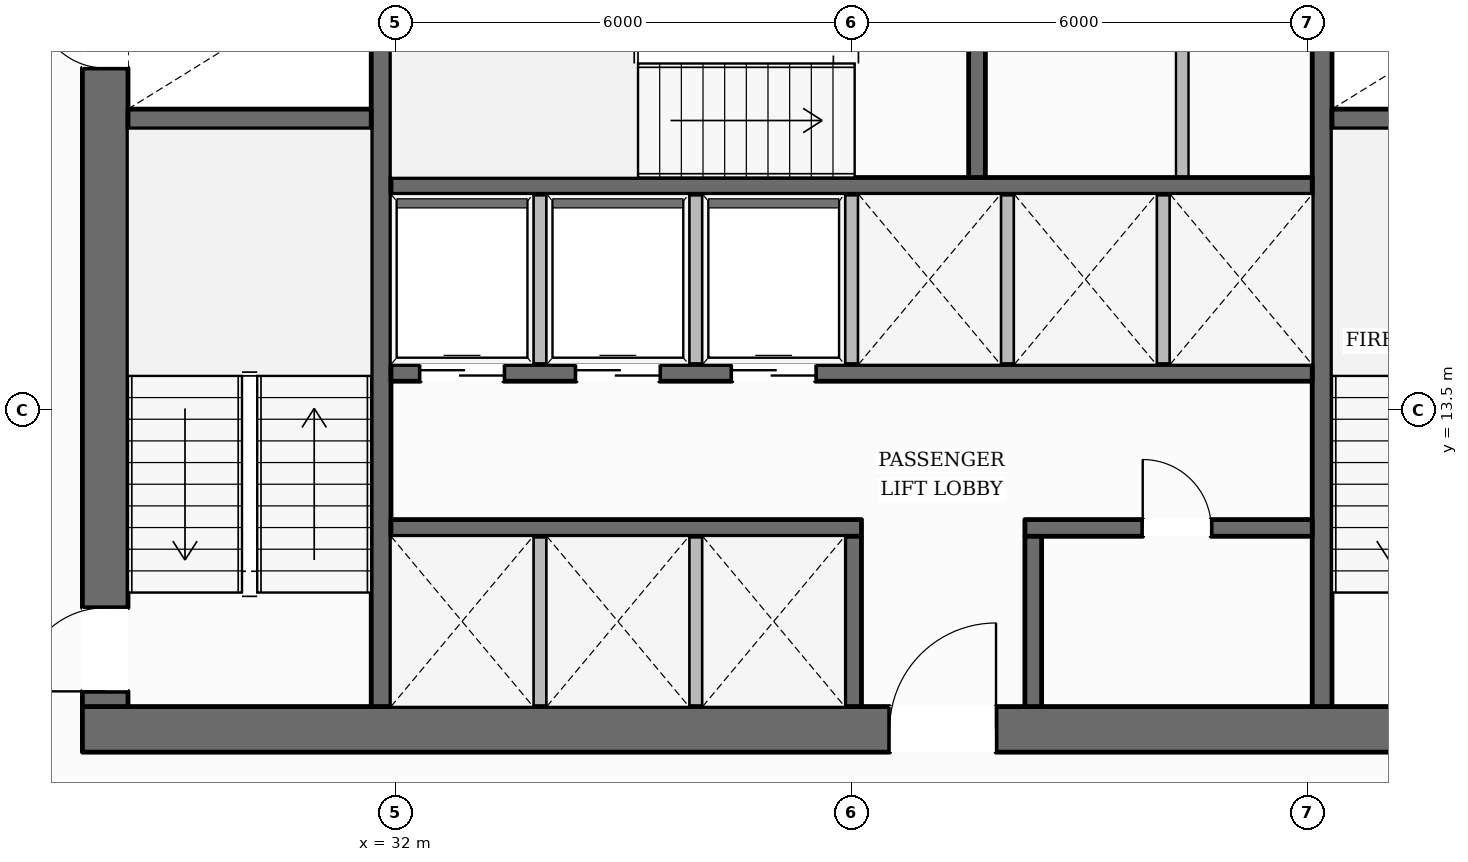
"""IFC4 building model, lengths in metres.
Left out: names, types, materials, properties, quantities, classifications, styles, units other than length and angle.
Written with IfcOpenShell. Run it as: python <this file> out.ifc"""

import sys

from ifc_helpers import new_model, si_unit, direction, frame, frame_2d, origin, place, context, subcontext, project, spatial, rectangle, extrude, element, fill, save


model = new_model("IFC4")
c1 = context("Model", 3, precision=1e-05, world=origin(), true_north=direction((0.0, 1.0)))
c2 = subcontext(c1, "Body", "Model", "MODEL_VIEW")
j1 = project(units=[si_unit("LENGTHUNIT", "METRE"), si_unit("PLANEANGLEUNIT", "RADIAN")], contexts=[c1])
p1 = place(None, origin())
s1 = spatial("IfcSite", under=j1, at=p1, CompositionType="ELEMENT")
p2 = place(p1, origin())
s2 = spatial("IfcBuilding", under=s1, at=p2, CompositionType="ELEMENT")
p3 = place(p2, frame((0.0, 0.0, 52.2)))
s3 = spatial("IfcBuildingStorey", under=s2, at=p3, CompositionType="ELEMENT", Elevation=52.2)
p4 = place(p3, frame((27.88, 9.3, 0.0), z_axis=(0.0, 0.0, 1.0), x_axis=(1.0, 0.0, 0.0)))
e1 = element("IfcWall", 1, at=p4, inside=s3, PredefinedType="SOLIDWALL", context=c2, shape_type="SweptSolid", body=[
    extrude(rectangle(XDim=20.24, YDim=0.6, at=frame_2d((10.12, 0.0))), origin(), (0.0, 0.0, 1.0), 3.59),
])
p5 = place(p4, frame((10.62, 0.0, 0.0)))
e2 = element("IfcOpeningElement", 2, at=p5, cuts=e1, PredefinedType="OPENING", context=c2, shape_type="SweptSolid", body=[
    extrude(rectangle(XDim=1.4, YDim=2.2, at=frame_2d((0.7, 1.1))), frame((0.0, 0.31, 0.0), z_axis=(0.0, -1.0, 0.0), x_axis=(1.0, 0.0, 0.0)), (0.0, 0.0, 1.0), 0.62),
])
p6 = place(p3, frame((28.18, 9.6, 0.0), z_axis=(0.0, 0.0, 1.0), x_axis=(0.0, 1.0, 0.0)))
e3 = element("IfcWall", 3, at=p6, inside=s3, PredefinedType="SOLIDWALL", context=c2, shape_type="SweptSolid", body=[
    extrude(rectangle(XDim=13.0, YDim=0.6, at=frame_2d((6.5, 0.0))), origin(), (0.0, 0.0, 1.0), 3.59),
])
p7 = place(p6, frame((0.2, 0.0, 0.0)))
e4 = element("IfcOpeningElement", 4, at=p7, cuts=e3, PredefinedType="OPENING", context=c2, shape_type="SweptSolid", body=[
    extrude(rectangle(XDim=1.1, YDim=2.15, at=frame_2d((0.55, 1.075))), frame((0.0, 0.31, 0.0), z_axis=(0.0, -1.0, 0.0), x_axis=(1.0, 0.0, 0.0)), (0.0, 0.0, 1.0), 0.62),
])
p8 = place(p6, frame((8.4, 0.0, 0.0)))
e5 = element("IfcOpeningElement", 5, at=p8, cuts=e3, PredefinedType="OPENING", context=c2, shape_type="SweptSolid", body=[
    extrude(rectangle(XDim=0.9, YDim=2.1, at=frame_2d((0.45, 1.05))), frame((0.0, 0.31, 0.0), z_axis=(0.0, -1.0, 0.0), x_axis=(1.0, 0.0, 0.0)), (0.0, 0.0, 1.0), 0.62),
])
p9 = place(p3, frame((31.81, 9.6, 0.0), z_axis=(0.0, 0.0, 1.0), x_axis=(0.0, 1.0, 0.0)))
e6 = element("IfcWall", 6, at=p9, inside=s3, PredefinedType="SHEAR", context=c2, shape_type="SweptSolid", body=[
    extrude(rectangle(XDim=13.0, YDim=0.26, at=frame_2d((6.5, 0.0))), origin(), (0.0, 0.0, 1.0), 3.59),
])
p10 = place(p9, frame((10.925, 0.0, 0.0)))
e7 = element("IfcOpeningElement", 7, at=p10, cuts=e6, PredefinedType="OPENING", context=c2, shape_type="SweptSolid", body=[
    extrude(rectangle(XDim=1.25, YDim=2.25, at=frame_2d((0.625, 1.125))), frame((0.0, 0.14, 0.0), z_axis=(0.0, -1.0, 0.0), x_axis=(1.0, 0.0, 0.0)), (0.0, 0.0, 1.0), 0.28),
])
p11 = place(p3, frame((44.19, 9.6, 0.0), z_axis=(0.0, 0.0, 1.0), x_axis=(0.0, 1.0, 0.0)))
e8 = element("IfcWall", 8, at=p11, inside=s3, PredefinedType="SHEAR", context=c2, shape_type="SweptSolid", body=[
    extrude(rectangle(XDim=13.0, YDim=0.26, at=frame_2d((6.5, 0.0))), origin(), (0.0, 0.0, 1.0), 3.59),
])
p12 = place(p11, frame((10.925, 0.0, 0.0)))
e9 = element("IfcOpeningElement", 9, at=p12, cuts=e8, PredefinedType="OPENING", context=c2, shape_type="SweptSolid", body=[
    extrude(rectangle(XDim=1.25, YDim=2.25, at=frame_2d((0.625, 1.125))), frame((0.0, 0.14, 0.0), z_axis=(0.0, -1.0, 0.0), x_axis=(1.0, 0.0, 0.0)), (0.0, 0.0, 1.0), 0.28),
])
for number, where, z_axis, x_axis in (
    (10, (28.48, 17.33, 0.0), (0.0, 0.0, 1.0), (1.0, 0.0, 0.0)),
    (11, (44.32, 17.33, 0.0), (0.0, 0.0, 1.0), (1.0, 0.0, 0.0)),
):
    element("IfcWall", number, at=place(p3, frame(where, z_axis=z_axis, x_axis=x_axis)), inside=s3, PredefinedType="SHEAR", context=c2, shape_type="SweptSolid", body=[
        extrude(rectangle(XDim=3.2, YDim=0.26, at=frame_2d((1.6, 0.0))), origin(), (0.0, 0.0, 1.0), 3.59),
    ])
p13 = place(p3, frame((31.94, 16.45, 0.0), z_axis=(0.0, 0.0, 1.0), x_axis=(1.0, 0.0, 0.0)))
e12 = element("IfcWall", 12, at=p13, inside=s3, PredefinedType="SOLIDWALL", context=c2, shape_type="SweptSolid", body=[
    extrude(rectangle(XDim=12.12, YDim=0.22, at=frame_2d((6.06, 0.0))), origin(), (0.0, 0.0, 1.0), 3.59),
])
p14 = place(p3, frame((39.65, 16.56, 0.0), z_axis=(0.0, 0.0, 1.0), x_axis=(0.0, 1.0, 0.0)))
e13 = element("IfcWall", 13, at=p14, inside=s3, PredefinedType="SOLIDWALL", context=c2, shape_type="SweptSolid", body=[
    extrude(rectangle(XDim=3.2, YDim=0.22, at=frame_2d((1.6, 0.0))), origin(), (0.0, 0.0, 1.0), 3.59),
])
p15 = place(p3, frame((31.94, 13.99, 0.0), z_axis=(0.0, 0.0, 1.0), x_axis=(1.0, 0.0, 0.0)))
e14 = element("IfcWall", 14, at=p15, inside=s3, PredefinedType="SOLIDWALL", context=c2, shape_type="SweptSolid", body=[
    extrude(rectangle(XDim=12.12, YDim=0.22, at=frame_2d((6.06, 0.0))), origin(), (0.0, 0.0, 1.0), 3.59),
])
p16 = place(p15, frame((0.385, 0.0, 0.0)))
e15 = element("IfcOpeningElement", 15, at=p16, cuts=e14, PredefinedType="OPENING", context=c2, shape_type="SweptSolid", body=[
    extrude(rectangle(XDim=1.1, YDim=2.2, at=frame_2d((0.55, 1.1))), frame((0.0, 0.12, 0.0), z_axis=(0.0, -1.0, 0.0), x_axis=(1.0, 0.0, 0.0)), (0.0, 0.0, 1.0), 0.24),
])
p17 = place(p15, frame((2.435, 0.0, 0.0)))
e16 = element("IfcOpeningElement", 16, at=p17, cuts=e14, PredefinedType="OPENING", context=c2, shape_type="SweptSolid", body=[
    extrude(rectangle(XDim=1.1, YDim=2.2, at=frame_2d((0.55, 1.1))), frame((0.0, 0.12, 0.0), z_axis=(0.0, -1.0, 0.0), x_axis=(1.0, 0.0, 0.0)), (0.0, 0.0, 1.0), 0.24),
])
p18 = place(p15, frame((4.485, 0.0, 0.0)))
e17 = element("IfcOpeningElement", 17, at=p18, cuts=e14, PredefinedType="OPENING", context=c2, shape_type="SweptSolid", body=[
    extrude(rectangle(XDim=1.1, YDim=2.2, at=frame_2d((0.55, 1.1))), frame((0.0, 0.12, 0.0), z_axis=(0.0, -1.0, 0.0), x_axis=(1.0, 0.0, 0.0)), (0.0, 0.0, 1.0), 0.24),
])
p19 = place(p3, frame((31.94, 11.95, 0.0), z_axis=(0.0, 0.0, 1.0), x_axis=(1.0, 0.0, 0.0)))
e18 = element("IfcWall", 18, at=p19, inside=s3, PredefinedType="SOLIDWALL", context=c2, shape_type="SweptSolid", body=[
    extrude(rectangle(XDim=6.19, YDim=0.22, at=frame_2d((3.095, 0.0))), origin(), (0.0, 0.0, 1.0), 3.59),
])
p20 = place(p3, frame((40.28, 11.95, 0.0), z_axis=(0.0, 0.0, 1.0), x_axis=(1.0, 0.0, 0.0)))
e19 = element("IfcWall", 19, at=p20, inside=s3, PredefinedType="SOLIDWALL", context=c2, shape_type="SweptSolid", body=[
    extrude(rectangle(XDim=3.78, YDim=0.22, at=frame_2d((1.89, 0.0))), origin(), (0.0, 0.0, 1.0), 3.59),
])
p21 = place(p20, frame((1.55, 0.0, 0.0)))
e20 = element("IfcOpeningElement", 20, at=p21, cuts=e19, PredefinedType="OPENING", context=c2, shape_type="SweptSolid", body=[
    extrude(rectangle(XDim=0.9, YDim=2.1, at=frame_2d((0.45, 1.05))), frame((0.0, 0.12, 0.0), z_axis=(0.0, -1.0, 0.0), x_axis=(1.0, 0.0, 0.0)), (0.0, 0.0, 1.0), 0.24),
])
for number, where, z_axis, x_axis in (
    (21, (38.02, 9.6, 0.0), (0.0, 0.0, 1.0), (0.0, 1.0, 0.0)),
    (22, (40.39, 9.6, 0.0), (0.0, 0.0, 1.0), (0.0, 1.0, 0.0)),
):
    element("IfcWall", number, at=place(p3, frame(where, z_axis=z_axis, x_axis=x_axis)), inside=s3, PredefinedType="SOLIDWALL", context=c2, shape_type="SweptSolid", body=[
        extrude(rectangle(XDim=2.24, YDim=0.22, at=frame_2d((1.12, 0.0))), origin(), (0.0, 0.0, 1.0), 3.59),
    ])
p22 = place(p3, frame((13.02, 14.028, 0.0), z_axis=(0.0, 0.0, 1.0), x_axis=(0.501385664719, 0.86522391045, 0.0)))
e23 = element("IfcWall", 23, at=p22, inside=s3, PredefinedType="STANDARD", context=c2, shape_type="SweptSolid", body=[
    extrude(rectangle(XDim=35.142, YDim=0.38, at=frame_2d((17.571, 0.0))), origin(), (0.0, 0.0, 1.0), 2.97),
])
p23 = place(p22, frame((30.991, 0.0, 0.65)))
e24 = element("IfcOpeningElement", 24, at=p23, cuts=e23, PredefinedType="OPENING", context=c2, shape_type="SweptSolid", body=[
    extrude(rectangle(XDim=1.65, YDim=1.75, at=frame_2d((0.825, 0.875))), frame((0.0, 0.2, 0.0), z_axis=(0.0, -1.0, 0.0), x_axis=(1.0, 0.0, 0.0)), (0.0, 0.0, 1.0), 0.4),
])
p24 = place(p22, frame((25.293, 0.0, 0.65)))
e25 = element("IfcOpeningElement", 25, at=p24, cuts=e23, PredefinedType="OPENING", context=c2, shape_type="SweptSolid", body=[
    extrude(rectangle(XDim=1.65, YDim=1.75, at=frame_2d((0.825, 0.875))), frame((0.0, 0.2, 0.0), z_axis=(0.0, -1.0, 0.0), x_axis=(1.0, 0.0, 0.0)), (0.0, 0.0, 1.0), 0.4),
])
p25 = place(p22, frame((13.898, 0.0, 0.65)))
e26 = element("IfcOpeningElement", 26, at=p25, cuts=e23, PredefinedType="OPENING", context=c2, shape_type="SweptSolid", body=[
    extrude(rectangle(XDim=1.65, YDim=1.75, at=frame_2d((0.825, 0.875))), frame((0.0, 0.2, 0.0), z_axis=(0.0, -1.0, 0.0), x_axis=(1.0, 0.0, 0.0)), (0.0, 0.0, 1.0), 0.4),
])
p26 = place(p22, frame((8.201, 0.0, 0.65)))
e27 = element("IfcOpeningElement", 27, at=p26, cuts=e23, PredefinedType="OPENING", context=c2, shape_type="SweptSolid", body=[
    extrude(rectangle(XDim=1.65, YDim=1.75, at=frame_2d((0.825, 0.875))), frame((0.0, 0.2, 0.0), z_axis=(0.0, -1.0, 0.0), x_axis=(1.0, 0.0, 0.0)), (0.0, 0.0, 1.0), 0.4),
])
p27 = place(p22, frame((2.503, 0.0, 0.65)))
e28 = element("IfcOpeningElement", 28, at=p27, cuts=e23, PredefinedType="OPENING", context=c2, shape_type="SweptSolid", body=[
    extrude(rectangle(XDim=1.65, YDim=1.75, at=frame_2d((0.825, 0.875))), frame((0.0, 0.2, 0.0), z_axis=(0.0, -1.0, 0.0), x_axis=(1.0, 0.0, 0.0)), (0.0, 0.0, 1.0), 0.4),
])
for number, where, z_axis, x_axis in (
    (29, (33.9, 9.6, 0.0), (0.0, 0.0, 1.0), (0.0, 1.0, 0.0)),
    (30, (35.95, 9.6, 0.0), (0.0, 0.0, 1.0), (0.0, 1.0, 0.0)),
    (31, (33.9, 14.1, 0.0), (0.0, 0.0, 1.0), (0.0, 1.0, 0.0)),
    (32, (35.95, 14.1, 0.0), (0.0, 0.0, 1.0), (0.0, 1.0, 0.0)),
    (33, (38.0, 14.1, 0.0), (0.0, 0.0, 1.0), (0.0, 1.0, 0.0)),
    (34, (40.05, 14.1, 0.0), (0.0, 0.0, 1.0), (0.0, 1.0, 0.0)),
    (35, (42.1, 14.1, 0.0), (0.0, 0.0, 1.0), (0.0, 1.0, 0.0)),
):
    element("IfcWall", number, at=place(p3, frame(where, z_axis=z_axis, x_axis=x_axis)), inside=s3, PredefinedType="PARTITIONING", context=c2, shape_type="SweptSolid", body=[
        extrude(rectangle(XDim=2.24, YDim=0.165, at=frame_2d((1.12, 0.0))), origin(), (0.0, 0.0, 1.0), 3.59),
    ])
p28 = place(p3, frame((42.35, 16.56, 0.0), z_axis=(0.0, 0.0, 1.0), x_axis=(0.0, 1.0, 0.0)))
e36 = element("IfcWall", 36, at=p28, inside=s3, PredefinedType="PARTITIONING", context=c2, shape_type="SweptSolid", body=[
    extrude(rectangle(XDim=3.2, YDim=0.165, at=frame_2d((1.6, 0.0))), origin(), (0.0, 0.0, 1.0), 3.59),
])
p29 = place(p7, origin())
e37 = element("IfcDoor", 37, at=p29, inside=s3, OperationType="SINGLE_SWING_LEFT", PredefinedType="DOOR", context=c2, shape_type="SweptSolid", body=[
    extrude(rectangle(XDim=1.1, YDim=2.15, at=frame_2d((0.55, 1.075))), frame((0.0, 0.025, 0.0), z_axis=(0.0, -1.0, 0.0), x_axis=(1.0, 0.0, 0.0)), (0.0, 0.0, 1.0), 0.05),
])
fill(e4, e37)
p30 = place(p8, origin())
e38 = element("IfcDoor", 38, at=p30, inside=s3, OperationType="SINGLE_SWING_RIGHT", PredefinedType="DOOR", context=c2, shape_type="SweptSolid", body=[
    extrude(rectangle(XDim=0.9, YDim=2.1, at=frame_2d((0.45, 1.05))), frame((0.0, 0.025, 0.0), z_axis=(0.0, -1.0, 0.0), x_axis=(1.0, 0.0, 0.0)), (0.0, 0.0, 1.0), 0.05),
])
fill(e5, e38)
p31 = place(p5, origin())
e39 = element("IfcDoor", 39, at=p31, inside=s3, OperationType="SINGLE_SWING_RIGHT", PredefinedType="DOOR", context=c2, shape_type="SweptSolid", body=[
    extrude(rectangle(XDim=1.4, YDim=2.2, at=frame_2d((0.7, 1.1))), frame((0.0, 0.025, 0.0), z_axis=(0.0, -1.0, 0.0), x_axis=(1.0, 0.0, 0.0)), (0.0, 0.0, 1.0), 0.05),
])
fill(e2, e39)
p32 = place(p16, origin())
e40 = element("IfcDoor", 40, at=p32, inside=s3, OperationType="DOUBLE_DOOR_SLIDING", PredefinedType="DOOR", context=c2, shape_type="SweptSolid", body=[
    extrude(rectangle(XDim=1.1, YDim=2.2, at=frame_2d((0.55, 1.1))), frame((0.0, 0.025, 0.0), z_axis=(0.0, -1.0, 0.0), x_axis=(1.0, 0.0, 0.0)), (0.0, 0.0, 1.0), 0.05),
])
fill(e15, e40)
p33 = place(p17, origin())
e41 = element("IfcDoor", 41, at=p33, inside=s3, OperationType="DOUBLE_DOOR_SLIDING", PredefinedType="DOOR", context=c2, shape_type="SweptSolid", body=[
    extrude(rectangle(XDim=1.1, YDim=2.2, at=frame_2d((0.55, 1.1))), frame((0.0, 0.025, 0.0), z_axis=(0.0, -1.0, 0.0), x_axis=(1.0, 0.0, 0.0)), (0.0, 0.0, 1.0), 0.05),
])
fill(e16, e41)
p34 = place(p18, origin())
e42 = element("IfcDoor", 42, at=p34, inside=s3, OperationType="DOUBLE_DOOR_SLIDING", PredefinedType="DOOR", context=c2, shape_type="SweptSolid", body=[
    extrude(rectangle(XDim=1.1, YDim=2.2, at=frame_2d((0.55, 1.1))), frame((0.0, 0.025, 0.0), z_axis=(0.0, -1.0, 0.0), x_axis=(1.0, 0.0, 0.0)), (0.0, 0.0, 1.0), 0.05),
])
fill(e17, e42)
p35 = place(p21, origin())
e43 = element("IfcDoor", 43, at=p35, inside=s3, OperationType="SINGLE_SWING_LEFT", PredefinedType="DOOR", context=c2, shape_type="SweptSolid", body=[
    extrude(rectangle(XDim=0.9, YDim=2.1, at=frame_2d((0.45, 1.05))), frame((0.0, 0.025, 0.0), z_axis=(0.0, -1.0, 0.0), x_axis=(1.0, 0.0, 0.0)), (0.0, 0.0, 1.0), 0.05),
])
fill(e20, e43)
save(model, sys.argv[1])
